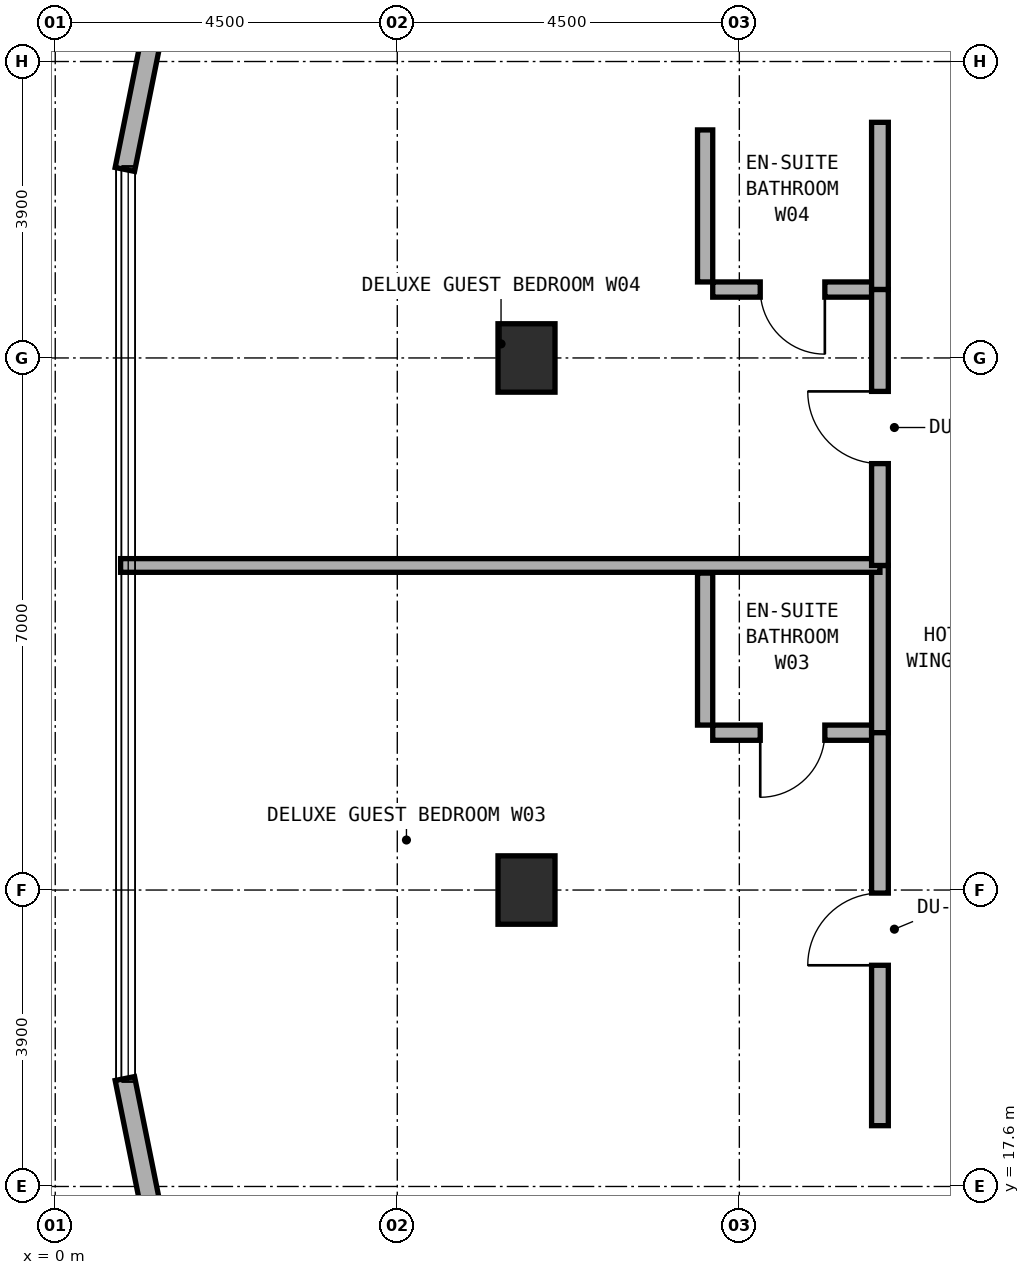
"""IFC4 building model, lengths in metres.
Left out: names, types, materials, properties, quantities, classifications, styles, units other than length and angle.
Written with IfcOpenShell. Run it as: python <this file> out.ifc"""

import sys

from ifc_helpers import new_model, si_unit, direction, frame, frame_2d, origin, origin_2d, place, context, subcontext, project, spatial, rectangle, extrude, element, fill, save


model = new_model("IFC4")
c1 = context("Model", 3, precision=1e-05, world=origin(), true_north=direction((0.0, 1.0)))
c2 = subcontext(c1, "Body", "Model", "MODEL_VIEW")
j1 = project(units=[si_unit("LENGTHUNIT", "METRE"), si_unit("PLANEANGLEUNIT", "RADIAN")], contexts=[c1])
p1 = place(None, origin())
s1 = spatial("IfcSite", under=j1, at=p1, CompositionType="ELEMENT")
p2 = place(p1, origin())
s2 = spatial("IfcBuilding", under=s1, at=p2, CompositionType="ELEMENT")
p3 = place(p2, frame((0.0, 0.0, 166.0)))
s3 = spatial("IfcBuildingStorey", under=s2, at=p3, CompositionType="ELEMENT", Elevation=166.0)
for number, where, z_axis, x_axis in (
    (1, (6.2, 21.5, 0.0), (0.0, 0.0, 1.0), (1.0, 0.0, 0.0)),
    (2, (6.2, 28.5, 0.0), (0.0, 0.0, 1.0), (1.0, 0.0, 0.0)),
):
    element("IfcColumn", number, at=place(p3, frame(where, z_axis=z_axis, x_axis=x_axis)), inside=s3, PredefinedType="COLUMN", context=c2, shape_type="SweptSolid", body=[
        extrude(rectangle(XDim=0.75, YDim=0.9, at=origin_2d()), origin(), (0.0, 0.0, 1.0), 3.5),
    ])
p4 = place(p3, frame((2.729, 39.982, 0.0), z_axis=(0.0, 0.0, 1.0), x_axis=(-0.197435082048, -0.980315963543, 0.0)))
e3 = element("IfcWall", 3, at=p4, inside=s3, PredefinedType="STANDARD", context=c2, shape_type="SweptSolid", body=[
    extrude(rectangle(XDim=9.183, YDim=0.26, at=frame_2d((4.591, 0.0))), origin(), (0.0, 0.0, 1.0), 3.22),
])
p5 = place(p4, frame((4.436, 0.0, 0.85)))
e4 = element("IfcOpeningElement", 4, at=p5, cuts=e3, PredefinedType="OPENING", context=c2, shape_type="SweptSolid", body=[
    extrude(rectangle(XDim=2.1, YDim=1.5, at=frame_2d((1.05, 0.75))), frame((0.0, 0.14, 0.0), z_axis=(0.0, -1.0, 0.0), x_axis=(1.0, 0.0, 0.0)), (0.0, 0.0, 1.0), 0.28),
])
p6 = place(p3, frame((0.916, 19.02, 0.0), z_axis=(0.0, 0.0, 1.0), x_axis=(0.197435082048, -0.980315963543, 0.0)))
e5 = element("IfcWall", 5, at=p6, inside=s3, PredefinedType="STANDARD", context=c2, shape_type="SweptSolid", body=[
    extrude(rectangle(XDim=9.183, YDim=0.26, at=frame_2d((4.591, 0.0))), origin(), (0.0, 0.0, 1.0), 3.22),
])
p7 = place(p6, frame((2.647, 0.0, 0.85)))
e6 = element("IfcOpeningElement", 6, at=p7, cuts=e5, PredefinedType="OPENING", context=c2, shape_type="SweptSolid", body=[
    extrude(rectangle(XDim=2.1, YDim=1.5, at=frame_2d((1.05, 0.75))), frame((0.0, 0.14, 0.0), z_axis=(0.0, -1.0, 0.0), x_axis=(1.0, 0.0, 0.0)), (0.0, 0.0, 1.0), 0.28),
])
p8 = place(p3, frame((8.65, 23.57, 0.0), z_axis=(0.0, 0.0, 1.0), x_axis=(1.0, 0.0, 0.0)))
e7 = element("IfcWall", 7, at=p8, inside=s3, PredefinedType="PLUMBINGWALL", context=c2, shape_type="SweptSolid", body=[
    extrude(rectangle(XDim=2.1, YDim=0.2, at=frame_2d((1.05, 0.0))), origin(), (0.0, 0.0, 1.0), 3.22),
])
p9 = place(p8, frame((0.625, 0.0, 0.0)))
e8 = element("IfcOpeningElement", 8, at=p9, cuts=e7, PredefinedType="OPENING", context=c2, shape_type="SweptSolid", body=[
    extrude(rectangle(XDim=0.85, YDim=2.1, at=frame_2d((0.425, 1.05))), frame((0.0, 0.11, 0.0), z_axis=(0.0, -1.0, 0.0), x_axis=(1.0, 0.0, 0.0)), (0.0, 0.0, 1.0), 0.22),
])
p10 = place(p3, frame((8.55, 23.67, 0.0), z_axis=(0.0, 0.0, 1.0), x_axis=(0.0, 1.0, 0.0)))
e9 = element("IfcWall", 9, at=p10, inside=s3, PredefinedType="PLUMBINGWALL", context=c2, shape_type="SweptSolid", body=[
    extrude(rectangle(XDim=2.0, YDim=0.2, at=frame_2d((1.0, 0.0))), origin(), (0.0, 0.0, 1.0), 3.22),
])
p11 = place(p3, frame((10.85, 23.57, 0.0), z_axis=(0.0, 0.0, 1.0), x_axis=(0.0, 1.0, 0.0)))
e10 = element("IfcWall", 10, at=p11, inside=s3, PredefinedType="SOLIDWALL", context=c2, shape_type="SweptSolid", body=[
    extrude(rectangle(XDim=2.2, YDim=0.22, at=frame_2d((1.1, 0.0))), origin(), (0.0, 0.0, 1.0), 3.22),
])
p12 = place(p3, frame((10.85, 18.4, 0.0), z_axis=(0.0, 0.0, 1.0), x_axis=(0.0, 1.0, 0.0)))
e11 = element("IfcWall", 11, at=p12, inside=s3, PredefinedType="SOLIDWALL", context=c2, shape_type="SweptSolid", body=[
    extrude(rectangle(XDim=5.17, YDim=0.22, at=frame_2d((2.585, 0.0))), origin(), (0.0, 0.0, 1.0), 2.795),
])
p13 = place(p12, frame((2.11, 0.0, 0.0)))
e12 = element("IfcOpeningElement", 12, at=p13, cuts=e11, PredefinedType="OPENING", context=c2, shape_type="SweptSolid", body=[
    extrude(rectangle(XDim=0.95, YDim=2.1, at=frame_2d((0.475, 1.05))), frame((0.0, 0.12, 0.0), z_axis=(0.0, -1.0, 0.0), x_axis=(1.0, 0.0, 0.0)), (0.0, 0.0, 1.0), 0.24),
])
p14 = place(p3, frame((0.86, 25.77, 0.0), z_axis=(0.0, 0.0, 1.0), x_axis=(1.0, 0.0, 0.0)))
e13 = element("IfcWall", 13, at=p14, inside=s3, PredefinedType="SOLIDWALL", context=c2, shape_type="SweptSolid", body=[
    extrude(rectangle(XDim=9.99, YDim=0.18, at=frame_2d((4.995, 0.0))), origin(), (0.0, 0.0, 1.0), 2.835),
])
p15 = place(p3, frame((8.65, 29.4, 0.0), z_axis=(0.0, 0.0, 1.0), x_axis=(1.0, 0.0, 0.0)))
e14 = element("IfcWall", 14, at=p15, inside=s3, PredefinedType="PLUMBINGWALL", context=c2, shape_type="SweptSolid", body=[
    extrude(rectangle(XDim=2.1, YDim=0.2, at=frame_2d((1.05, 0.0))), origin(), (0.0, 0.0, 1.0), 3.22),
])
p16 = place(p15, frame((0.625, 0.0, 0.0)))
e15 = element("IfcOpeningElement", 15, at=p16, cuts=e14, PredefinedType="OPENING", context=c2, shape_type="SweptSolid", body=[
    extrude(rectangle(XDim=0.85, YDim=2.1, at=frame_2d((0.425, 1.05))), frame((0.0, 0.11, 0.0), z_axis=(0.0, -1.0, 0.0), x_axis=(1.0, 0.0, 0.0)), (0.0, 0.0, 1.0), 0.22),
])
p17 = place(p3, frame((8.55, 29.5, 0.0), z_axis=(0.0, 0.0, 1.0), x_axis=(0.0, 1.0, 0.0)))
e16 = element("IfcWall", 16, at=p17, inside=s3, PredefinedType="PLUMBINGWALL", context=c2, shape_type="SweptSolid", body=[
    extrude(rectangle(XDim=2.0, YDim=0.2, at=frame_2d((1.0, 0.0))), origin(), (0.0, 0.0, 1.0), 3.22),
])
p18 = place(p3, frame((10.85, 29.4, 0.0), z_axis=(0.0, 0.0, 1.0), x_axis=(0.0, 1.0, 0.0)))
e17 = element("IfcWall", 17, at=p18, inside=s3, PredefinedType="SOLIDWALL", context=c2, shape_type="SweptSolid", body=[
    extrude(rectangle(XDim=2.2, YDim=0.22, at=frame_2d((1.1, 0.0))), origin(), (0.0, 0.0, 1.0), 3.22),
])
p19 = place(p3, frame((10.85, 25.77, 0.0), z_axis=(0.0, 0.0, 1.0), x_axis=(0.0, 1.0, 0.0)))
e18 = element("IfcWall", 18, at=p19, inside=s3, PredefinedType="SOLIDWALL", context=c2, shape_type="SweptSolid", body=[
    extrude(rectangle(XDim=3.63, YDim=0.22, at=frame_2d((1.815, 0.0))), origin(), (0.0, 0.0, 1.0), 2.795),
])
p20 = place(p19, frame((1.34, 0.0, 0.0)))
e19 = element("IfcOpeningElement", 19, at=p20, cuts=e18, PredefinedType="OPENING", context=c2, shape_type="SweptSolid", body=[
    extrude(rectangle(XDim=0.95, YDim=2.1, at=frame_2d((0.475, 1.05))), frame((0.0, 0.12, 0.0), z_axis=(0.0, -1.0, 0.0), x_axis=(1.0, 0.0, 0.0)), (0.0, 0.0, 1.0), 0.24),
])
p21 = place(p9, frame((0.85, 0.0, 0.0), z_axis=(0.0, 0.0, 1.0), x_axis=(-1.0, 0.0, 0.0)))
e20 = element("IfcDoor", 20, at=p21, inside=s3, OperationType="SINGLE_SWING_RIGHT", PredefinedType="DOOR", context=c2, shape_type="SweptSolid", body=[
    extrude(rectangle(XDim=0.85, YDim=2.1, at=frame_2d((0.425, 1.05))), frame((0.0, 0.025, 0.0), z_axis=(0.0, -1.0, 0.0), x_axis=(1.0, 0.0, 0.0)), (0.0, 0.0, 1.0), 0.05),
])
fill(e8, e20)
p22 = place(p13, origin())
e21 = element("IfcDoor", 21, at=p22, inside=s3, OperationType="SINGLE_SWING_LEFT", PredefinedType="DOOR", context=c2, shape_type="SweptSolid", body=[
    extrude(rectangle(XDim=0.95, YDim=2.1, at=frame_2d((0.475, 1.05))), frame((0.0, 0.025, 0.0), z_axis=(0.0, -1.0, 0.0), x_axis=(1.0, 0.0, 0.0)), (0.0, 0.0, 1.0), 0.05),
])
fill(e12, e21)
p23 = place(p16, frame((0.85, 0.0, 0.0), z_axis=(0.0, 0.0, 1.0), x_axis=(-1.0, 0.0, 0.0)))
e22 = element("IfcDoor", 22, at=p23, inside=s3, OperationType="SINGLE_SWING_LEFT", PredefinedType="DOOR", context=c2, shape_type="SweptSolid", body=[
    extrude(rectangle(XDim=0.85, YDim=2.1, at=frame_2d((0.425, 1.05))), frame((0.0, 0.025, 0.0), z_axis=(0.0, -1.0, 0.0), x_axis=(1.0, 0.0, 0.0)), (0.0, 0.0, 1.0), 0.05),
])
fill(e15, e22)
p24 = place(p20, origin())
e23 = element("IfcDoor", 23, at=p24, inside=s3, OperationType="SINGLE_SWING_RIGHT", PredefinedType="DOOR", context=c2, shape_type="SweptSolid", body=[
    extrude(rectangle(XDim=0.95, YDim=2.1, at=frame_2d((0.475, 1.05))), frame((0.0, 0.025, 0.0), z_axis=(0.0, -1.0, 0.0), x_axis=(1.0, 0.0, 0.0)), (0.0, 0.0, 1.0), 0.05),
])
fill(e19, e23)
save(model, sys.argv[1])
